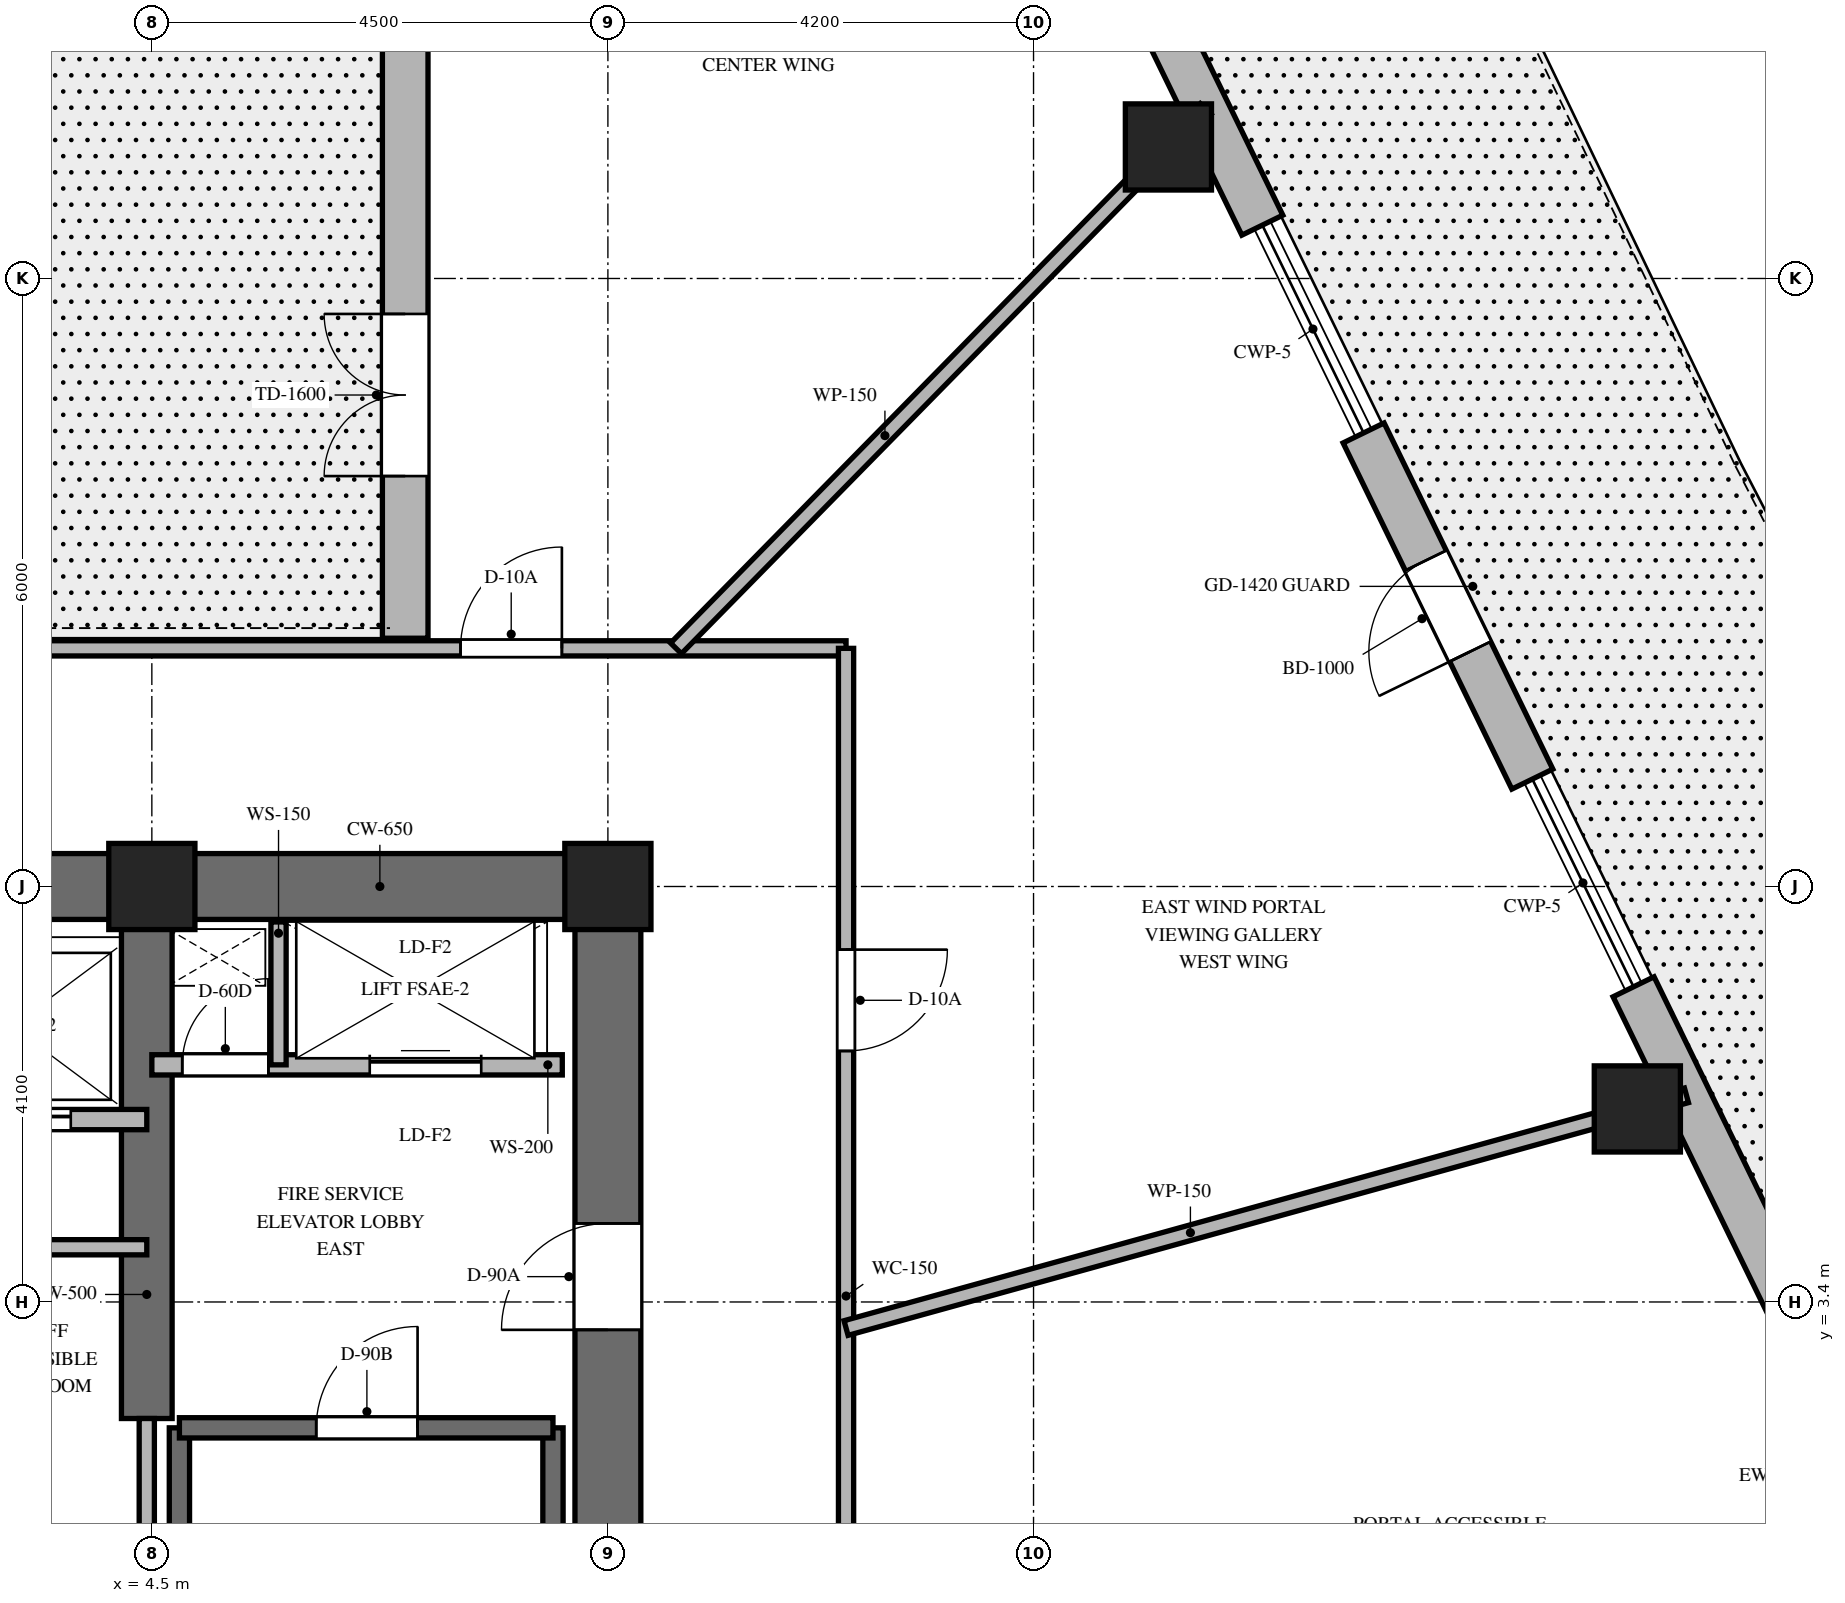
"""IFC4 building model, lengths in metres.
Left out: names, types, materials, properties, quantities, classifications, styles, units other than length and angle.
Written with IfcOpenShell. Run it as: python <this file> out.ifc"""

import sys

from ifc_helpers import new_model, si_unit, direction, frame, frame_2d, origin, origin_2d, place, context, subcontext, project, spatial, rectangle, extrude, element, fill, save


model = new_model("IFC4")
c1 = context("Model", 3, precision=1e-05, world=origin(), true_north=direction((0.0, 1.0)))
c2 = subcontext(c1, "Body", "Model", "MODEL_VIEW")
j1 = project(units=[si_unit("LENGTHUNIT", "METRE"), si_unit("PLANEANGLEUNIT", "RADIAN")], contexts=[c1])
p1 = place(None, origin())
s1 = spatial("IfcSite", under=j1, at=p1, CompositionType="ELEMENT")
p2 = place(p1, origin())
s2 = spatial("IfcBuilding", under=s1, at=p2, CompositionType="ELEMENT")
p3 = place(p2, frame((0.0, 0.0, 288.6)))
s3 = spatial("IfcBuildingStorey", under=s2, at=p3, CompositionType="ELEMENT", Elevation=288.6)
p4 = place(p3, frame((1.85, 7.5, 0.0), z_axis=(0.0, 0.0, 1.0), x_axis=(1.0, 0.0, 0.0)))
e1 = element("IfcWall", 1, at=p4, inside=s3, PredefinedType="SHEAR", context=c2, shape_type="SweptSolid", body=[
    extrude(rectangle(XDim=7.475, YDim=0.65, at=frame_2d((3.737, 0.0))), origin(), (0.0, 0.0, 1.0), 4.5),
])
p5 = place(p3, frame((9.0, -7.175, 0.0), z_axis=(0.0, 0.0, 1.0), x_axis=(0.0, 1.0, 0.0)))
e2 = element("IfcWall", 2, at=p5, inside=s3, PredefinedType="SHEAR", context=c2, shape_type="SweptSolid", body=[
    extrude(rectangle(XDim=14.35, YDim=0.65, at=frame_2d((7.175, 0.0))), origin(), (0.0, 0.0, 1.0), 4.5),
])
p6 = place(p5, frame((10.3, 0.0, 0.0)))
e3 = element("IfcOpeningElement", 3, at=p6, cuts=e2, PredefinedType="OPENING", context=c2, shape_type="SweptSolid", body=[
    extrude(rectangle(XDim=1.05, YDim=2.15, at=frame_2d((0.525, 1.075))), frame((0.0, 0.335, 0.0), z_axis=(0.0, -1.0, 0.0), x_axis=(1.0, 0.0, 0.0)), (0.0, 0.0, 1.0), 0.67),
])
p7 = place(p3, frame((4.45, 2.25, 0.0), z_axis=(0.0, 0.0, 1.0), x_axis=(0.0, 1.0, 0.0)))
e4 = element("IfcWall", 4, at=p7, inside=s3, PredefinedType="SHEAR", context=c2, shape_type="SweptSolid", body=[
    extrude(rectangle(XDim=4.925, YDim=0.5, at=frame_2d((2.462, 0.0))), origin(), (0.0, 0.0, 1.0), 4.5),
])
for number, where, z_axis, x_axis in (
    (5, (4.772, -6.985, 0.0), (0.0, 0.0, 1.0), (0.0, 1.0, 0.0)),
    (6, (8.458, -6.985, 0.0), (0.0, 0.0, 1.0), (0.0, 1.0, 0.0)),
):
    element("IfcWall", number, at=place(p3, frame(where, z_axis=z_axis, x_axis=x_axis)), inside=s3, PredefinedType="SHEAR", context=c2, shape_type="SweptSolid", body=[
        extrude(rectangle(XDim=9.143, YDim=0.2, at=frame_2d((4.572, 0.0))), origin(), (0.0, 0.0, 1.0), 4.5),
    ])
p8 = place(p3, frame((4.772, 2.158, 0.0), z_axis=(0.0, 0.0, 1.0), x_axis=(1.0, 0.0, 0.0)))
e7 = element("IfcWall", 7, at=p8, inside=s3, PredefinedType="SHEAR", context=c2, shape_type="SweptSolid", body=[
    extrude(rectangle(XDim=3.686, YDim=0.2, at=frame_2d((1.843, 0.0))), origin(), (0.0, 0.0, 1.0), 4.5),
])
p9 = place(p8, frame((1.35, 0.0, 0.0)))
e8 = element("IfcOpeningElement", 8, at=p9, cuts=e7, PredefinedType="OPENING", context=c2, shape_type="SweptSolid", body=[
    extrude(rectangle(XDim=1.0, YDim=2.15, at=frame_2d((0.5, 1.075))), frame((0.0, 0.11, 0.0), z_axis=(0.0, -1.0, 0.0), x_axis=(1.0, 0.0, 0.0)), (0.0, 0.0, 1.0), 0.22),
])
for number, where, z_axis, x_axis in (
    (9, (9.0, 7.5, 0.0), (0.0, 0.0, 1.0), (1.0, 0.0, 0.0)),
    (10, (4.5, 7.5, 0.0), (0.0, 0.0, 1.0), (1.0, 0.0, 0.0)),
    (11, (19.158, 5.305, 0.0), (0.0, 0.0, 1.0), (1.0, 0.0, 0.0)),
    (12, (14.531, 14.798, 0.0), (0.0, 0.0, 1.0), (1.0, 0.0, 0.0)),
):
    element("IfcColumn", number, at=place(p3, frame(where, z_axis=z_axis, x_axis=x_axis)), inside=s3, PredefinedType="COLUMN", context=c2, shape_type="SweptSolid", body=[
        extrude(rectangle(XDim=0.85, YDim=0.85, at=origin_2d()), origin(), (0.0, 0.0, 1.0), 4.5),
    ])
p10 = place(p3, frame((21.138, 2.371, 0.0), z_axis=(0.0, 0.0, 1.0), x_axis=(-0.438135313339, 0.898909031663, 0.0)))
e13 = element("IfcWall", 13, at=p10, inside=s3, PredefinedType="SOLIDWALL", context=c2, shape_type="SweptSolid", body=[
    extrude(rectangle(XDim=4.605, YDim=0.45, at=frame_2d((2.302, 0.0))), origin(), (0.0, 0.0, 1.0), 4.18),
])
p11 = place(p3, frame((18.122, 8.56, 0.0), z_axis=(0.0, 0.0, 1.0), x_axis=(-0.438118536586, 0.89891720859, 0.0)))
e14 = element("IfcWall", 14, at=p11, inside=s3, PredefinedType="SOLIDWALL", context=c2, shape_type="SweptSolid", body=[
    extrude(rectangle(XDim=3.8, YDim=0.45, at=frame_2d((1.9, 0.0))), origin(), (0.0, 0.0, 1.0), 4.18),
])
p12 = place(p11, frame((1.4, 0.0, 0.0)))
e15 = element("IfcOpeningElement", 15, at=p12, cuts=e14, PredefinedType="OPENING", context=c2, shape_type="SweptSolid", body=[
    extrude(rectangle(XDim=1.0, YDim=2.15, at=frame_2d((0.5, 1.075))), frame((0.0, 0.235, 0.0), z_axis=(0.0, -1.0, 0.0), x_axis=(1.0, 0.0, 0.0)), (0.0, 0.0, 1.0), 0.47),
])
p13 = place(p3, frame((15.458, 14.026, 0.0), z_axis=(0.0, 0.0, 1.0), x_axis=(-0.438101439155, 0.898925541416, 0.0)))
e16 = element("IfcWall", 16, at=p13, inside=s3, PredefinedType="SOLIDWALL", context=c2, shape_type="SweptSolid", body=[
    extrude(rectangle(XDim=4.599, YDim=0.45, at=frame_2d((2.299, 0.0))), origin(), (0.0, 0.0, 1.0), 4.18),
])
p14 = place(p3, frame((7.0, 9.95, 0.0), z_axis=(0.0, 0.0, 1.0), x_axis=(0.0, 1.0, 0.0)))
e17 = element("IfcWall", 17, at=p14, inside=s3, PredefinedType="SOLIDWALL", context=c2, shape_type="SweptSolid", body=[
    extrude(rectangle(XDim=10.125, YDim=0.45, at=frame_2d((5.062, 0.0))), origin(), (0.0, 0.0, 1.0), 4.18),
])
p15 = place(p14, frame((1.6, 0.0, 0.0)))
e18 = element("IfcOpeningElement", 18, at=p15, cuts=e17, PredefinedType="OPENING", context=c2, shape_type="SweptSolid", body=[
    extrude(rectangle(XDim=1.6, YDim=2.25, at=frame_2d((0.8, 1.125))), frame((0.0, 0.235, 0.0), z_axis=(0.0, -1.0, 0.0), x_axis=(1.0, 0.0, 0.0)), (0.0, 0.0, 1.0), 0.47),
])
p16 = place(p3, frame((4.5, 5.74, 0.0), z_axis=(0.0, 0.0, 1.0), x_axis=(1.0, 0.0, 0.0)))
e19 = element("IfcWall", 19, at=p16, inside=s3, PredefinedType="PARTITIONING", context=c2, shape_type="SweptSolid", body=[
    extrude(rectangle(XDim=4.05, YDim=0.2, at=frame_2d((2.025, 0.0))), origin(), (0.0, 0.0, 1.0), 4.18),
])
p17 = place(p16, frame((0.3, 0.0, 0.0)))
e20 = element("IfcOpeningElement", 20, at=p17, cuts=e19, PredefinedType="OPENING", context=c2, shape_type="SweptSolid", body=[
    extrude(rectangle(XDim=0.85, YDim=2.03, at=frame_2d((0.425, 1.015))), frame((0.0, 0.11, 0.0), z_axis=(0.0, -1.0, 0.0), x_axis=(1.0, 0.0, 0.0)), (0.0, 0.0, 1.0), 0.22),
])
p18 = place(p16, frame((2.15, 0.0, 0.0)))
e21 = element("IfcOpeningElement", 21, at=p18, cuts=e19, PredefinedType="OPENING", context=c2, shape_type="SweptSolid", body=[
    extrude(rectangle(XDim=1.1, YDim=2.2, at=frame_2d((0.55, 1.1))), frame((0.0, 0.11, 0.0), z_axis=(0.0, -1.0, 0.0), x_axis=(1.0, 0.0, 0.0)), (0.0, 0.0, 1.0), 0.22),
])
p19 = place(p3, frame((5.75, 5.74, 0.0), z_axis=(0.0, 0.0, 1.0), x_axis=(0.0, 1.0, 0.0)))
e22 = element("IfcWall", 22, at=p19, inside=s3, PredefinedType="PARTITIONING", context=c2, shape_type="SweptSolid", body=[
    extrude(rectangle(XDim=1.41, YDim=0.15, at=frame_2d((0.705, 0.0))), origin(), (0.0, 0.0, 1.0), 4.18),
])
p20 = place(p3, frame((1.85, 5.2, 0.0), z_axis=(0.0, 0.0, 1.0), x_axis=(1.0, 0.0, 0.0)))
e23 = element("IfcWall", 23, at=p20, inside=s3, PredefinedType="PARTITIONING", context=c2, shape_type="SweptSolid", body=[
    extrude(rectangle(XDim=2.6, YDim=0.2, at=frame_2d((1.3, 0.0))), origin(), (0.0, 0.0, 1.0), 4.18),
])
p21 = place(p20, frame((0.75, 0.0, 0.0)))
e24 = element("IfcOpeningElement", 24, at=p21, cuts=e23, PredefinedType="OPENING", context=c2, shape_type="SweptSolid", body=[
    extrude(rectangle(XDim=1.1, YDim=2.2, at=frame_2d((0.55, 1.1))), frame((0.0, 0.11, 0.0), z_axis=(0.0, -1.0, 0.0), x_axis=(1.0, 0.0, 0.0)), (0.0, 0.0, 1.0), 0.22),
])
p22 = place(p3, frame((4.45, -1.972, 0.0), z_axis=(0.0, 0.0, 1.0), x_axis=(0.0, 1.0, 0.0)))
e25 = element("IfcWall", 25, at=p22, inside=s3, PredefinedType="PARTITIONING", context=c2, shape_type="SweptSolid", body=[
    extrude(rectangle(XDim=4.222, YDim=0.15, at=frame_2d((2.111, 0.0))), origin(), (0.0, 0.0, 1.0), 4.18),
])
p23 = place(p3, frame((1.9, 3.94, 0.0), z_axis=(0.0, 0.0, 1.0), x_axis=(1.0, 0.0, 0.0)))
e26 = element("IfcWall", 26, at=p23, inside=s3, PredefinedType="PARTITIONING", context=c2, shape_type="SweptSolid", body=[
    extrude(rectangle(XDim=2.55, YDim=0.15, at=frame_2d((1.275, 0.0))), origin(), (0.0, 0.0, 1.0), 4.18),
])
p24 = place(p3, frame((-11.35, 9.85, 0.0), z_axis=(0.0, 0.0, 1.0), x_axis=(1.0, 0.0, 0.0)))
e27 = element("IfcWall", 27, at=p24, inside=s3, PredefinedType="PARTITIONING", context=c2, shape_type="SweptSolid", body=[
    extrude(rectangle(XDim=22.7, YDim=0.15, at=frame_2d((11.35, 0.0))), origin(), (0.0, 0.0, 1.0), 3.67),
])
p25 = place(p24, frame((18.896, 0.0, 0.0)))
e28 = element("IfcOpeningElement", 28, at=p25, cuts=e27, PredefinedType="OPENING", context=c2, shape_type="SweptSolid", body=[
    extrude(rectangle(XDim=1.0, YDim=2.03, at=frame_2d((0.5, 1.015))), frame((0.0, 0.085, 0.0), z_axis=(0.0, -1.0, 0.0), x_axis=(1.0, 0.0, 0.0)), (0.0, 0.0, 1.0), 0.17),
])
p26 = place(p3, frame((11.35, 9.85, 0.0), z_axis=(0.0, 0.0, 1.0), x_axis=(0.0, -1.0, 0.0)))
e29 = element("IfcWall", 29, at=p26, inside=s3, PredefinedType="PARTITIONING", context=c2, shape_type="SweptSolid", body=[
    extrude(rectangle(XDim=19.7, YDim=0.15, at=frame_2d((9.85, 0.0))), origin(), (0.0, 0.0, 1.0), 3.67),
])
p27 = place(p26, frame((2.973, 0.0, 0.0)))
e30 = element("IfcOpeningElement", 30, at=p27, cuts=e29, PredefinedType="OPENING", context=c2, shape_type="SweptSolid", body=[
    extrude(rectangle(XDim=1.0, YDim=2.03, at=frame_2d((0.5, 1.015))), frame((0.0, 0.085, 0.0), z_axis=(0.0, -1.0, 0.0), x_axis=(1.0, 0.0, 0.0)), (0.0, 0.0, 1.0), 0.17),
])
p28 = place(p26, frame((15.189, 0.0, 0.0)))
e31 = element("IfcOpeningElement", 31, at=p28, cuts=e29, PredefinedType="OPENING", context=c2, shape_type="SweptSolid", body=[
    extrude(rectangle(XDim=1.0, YDim=2.03, at=frame_2d((0.5, 1.015))), frame((0.0, 0.085, 0.0), z_axis=(0.0, -1.0, 0.0), x_axis=(1.0, 0.0, 0.0)), (0.0, 0.0, 1.0), 0.17),
])
p29 = place(p26, frame((8.81, 0.0, 0.0)))
e32 = element("IfcOpeningElement", 32, at=p29, cuts=e29, PredefinedType="OPENING", context=c2, shape_type="SweptSolid", body=[
    extrude(rectangle(XDim=1.0, YDim=2.03, at=frame_2d((0.5, 1.015))), frame((0.0, 0.085, 0.0), z_axis=(0.0, -1.0, 0.0), x_axis=(1.0, 0.0, 0.0)), (0.0, 0.0, 1.0), 0.17),
])
p30 = place(p3, frame((11.35, 3.143, 0.0), z_axis=(0.0, 0.0, 1.0), x_axis=(0.963731818141, 0.266872596386, 0.0)))
e33 = element("IfcWall", 33, at=p30, inside=s3, PredefinedType="PARTITIONING", context=c2, shape_type="SweptSolid", body=[
    extrude(rectangle(XDim=8.605, YDim=0.15, at=frame_2d((4.302, 0.0))), origin(), (0.0, 0.0, 1.0), 3.52),
])
p31 = place(p3, frame((9.672, 9.85, 0.0), z_axis=(0.0, 0.0, 1.0), x_axis=(0.700629771301, 0.713524998558, 0.0)))
e34 = element("IfcWall", 34, at=p31, inside=s3, PredefinedType="PARTITIONING", context=c2, shape_type="SweptSolid", body=[
    extrude(rectangle(XDim=7.459, YDim=0.15, at=frame_2d((3.73, 0.0))), origin(), (0.0, 0.0, 1.0), 3.52),
])
p32 = place(p12, origin())
e35 = element("IfcDoor", 35, at=p32, inside=s3, OperationType="SINGLE_SWING_LEFT", PredefinedType="DOOR", context=c2, shape_type="SweptSolid", body=[
    extrude(rectangle(XDim=1.0, YDim=2.15, at=frame_2d((0.5, 1.075))), frame((0.0, 0.025, 0.0), z_axis=(0.0, -1.0, 0.0), x_axis=(1.0, 0.0, 0.0)), (0.0, 0.0, 1.0), 0.05),
])
fill(e15, e35)
p33 = place(p15, origin())
e36 = element("IfcDoor", 36, at=p33, inside=s3, OperationType="DOUBLE_SWING_LEFT", PredefinedType="DOOR", context=c2, shape_type="SweptSolid", body=[
    extrude(rectangle(XDim=1.6, YDim=2.25, at=frame_2d((0.8, 1.125))), frame((0.0, 0.025, 0.0), z_axis=(0.0, -1.0, 0.0), x_axis=(1.0, 0.0, 0.0)), (0.0, 0.0, 1.0), 0.05),
])
fill(e18, e36)
p34 = place(p9, origin())
e37 = element("IfcDoor", 37, at=p34, inside=s3, OperationType="SINGLE_SWING_RIGHT", PredefinedType="DOOR", context=c2, shape_type="SweptSolid", body=[
    extrude(rectangle(XDim=1.0, YDim=2.15, at=frame_2d((0.5, 1.075))), frame((0.0, 0.025, 0.0), z_axis=(0.0, -1.0, 0.0), x_axis=(1.0, 0.0, 0.0)), (0.0, 0.0, 1.0), 0.05),
])
fill(e8, e37)
p35 = place(p6, origin())
e38 = element("IfcDoor", 38, at=p35, inside=s3, OperationType="SINGLE_SWING_LEFT", PredefinedType="DOOR", context=c2, shape_type="SweptSolid", body=[
    extrude(rectangle(XDim=1.05, YDim=2.15, at=frame_2d((0.525, 1.075))), frame((0.0, 0.025, 0.0), z_axis=(0.0, -1.0, 0.0), x_axis=(1.0, 0.0, 0.0)), (0.0, 0.0, 1.0), 0.05),
])
fill(e3, e38)
p36 = place(p17, origin())
e39 = element("IfcDoor", 39, at=p36, inside=s3, OperationType="SINGLE_SWING_RIGHT", PredefinedType="DOOR", context=c2, shape_type="SweptSolid", body=[
    extrude(rectangle(XDim=0.85, YDim=2.03, at=frame_2d((0.425, 1.015))), frame((0.0, 0.025, 0.0), z_axis=(0.0, -1.0, 0.0), x_axis=(1.0, 0.0, 0.0)), (0.0, 0.0, 1.0), 0.05),
])
fill(e20, e39)
p37 = place(p18, origin())
e40 = element("IfcDoor", 40, at=p37, inside=s3, OperationType="SLIDING_TO_RIGHT", PredefinedType="DOOR", context=c2, shape_type="SweptSolid", body=[
    extrude(rectangle(XDim=1.1, YDim=2.2, at=frame_2d((0.55, 1.1))), frame((0.0, 0.025, 0.0), z_axis=(0.0, -1.0, 0.0), x_axis=(1.0, 0.0, 0.0)), (0.0, 0.0, 1.0), 0.05),
])
fill(e21, e40)
p38 = place(p21, origin())
e41 = element("IfcDoor", 41, at=p38, inside=s3, OperationType="SLIDING_TO_RIGHT", PredefinedType="DOOR", context=c2, shape_type="SweptSolid", body=[
    extrude(rectangle(XDim=1.1, YDim=2.2, at=frame_2d((0.55, 1.1))), frame((0.0, 0.025, 0.0), z_axis=(0.0, -1.0, 0.0), x_axis=(1.0, 0.0, 0.0)), (0.0, 0.0, 1.0), 0.05),
])
fill(e24, e41)
p39 = place(p27, origin())
e42 = element("IfcDoor", 42, at=p39, inside=s3, OperationType="SINGLE_SWING_LEFT", PredefinedType="DOOR", context=c2, shape_type="SweptSolid", body=[
    extrude(rectangle(XDim=1.0, YDim=2.03, at=frame_2d((0.5, 1.015))), frame((0.0, 0.025, 0.0), z_axis=(0.0, -1.0, 0.0), x_axis=(1.0, 0.0, 0.0)), (0.0, 0.0, 1.0), 0.05),
])
fill(e30, e42)
p40 = place(p25, origin())
e43 = element("IfcDoor", 43, at=p40, inside=s3, OperationType="SINGLE_SWING_RIGHT", PredefinedType="DOOR", context=c2, shape_type="SweptSolid", body=[
    extrude(rectangle(XDim=1.0, YDim=2.03, at=frame_2d((0.5, 1.015))), frame((0.0, 0.025, 0.0), z_axis=(0.0, -1.0, 0.0), x_axis=(1.0, 0.0, 0.0)), (0.0, 0.0, 1.0), 0.05),
])
fill(e28, e43)
save(model, sys.argv[1])
